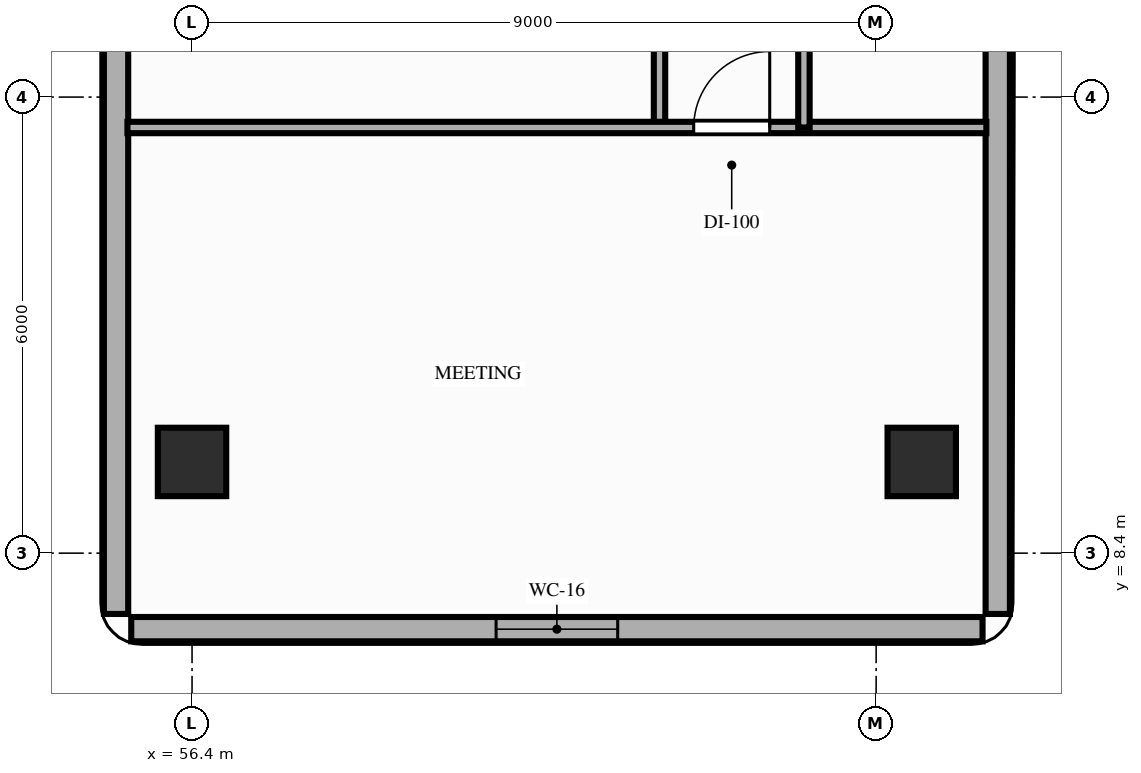
"""IFC4 building model, lengths in metres.
Left out: names, types, materials, properties, quantities, classifications, styles, units other than length and angle.
Written with IfcOpenShell. Run it as: python <this file> out.ifc"""

import sys

from ifc_helpers import new_model, si_unit, direction, frame, frame_2d, origin, origin_2d, place, context, subcontext, project, spatial, rectangle, extrude, element, fill, save


model = new_model("IFC4")
c1 = context("Model", 3, precision=1e-05, world=origin(), true_north=direction((0.0, 1.0)))
c2 = subcontext(c1, "Body", "Model", "MODEL_VIEW")
j1 = project(units=[si_unit("LENGTHUNIT", "METRE"), si_unit("PLANEANGLEUNIT", "RADIAN")], contexts=[c1])
p1 = place(None, origin())
s1 = spatial("IfcSite", under=j1, at=p1, CompositionType="ELEMENT")
p2 = place(p1, origin())
s2 = spatial("IfcBuilding", under=s1, at=p2, CompositionType="ELEMENT")
p3 = place(p2, frame((0.0, 0.0, 66.0)))
s3 = spatial("IfcBuildingStorey", under=s2, at=p3, CompositionType="ELEMENT", Elevation=66.0)
for number, where, z_axis, x_axis in (
    (1, (56.4, 9.6, 0.0), (0.0, 0.0, 1.0), (1.0, 0.0, 0.0)),
    (2, (66.0, 9.6, 0.0), (0.0, 0.0, 1.0), (1.0, 0.0, 0.0)),
):
    element("IfcColumn", number, at=place(p3, frame(where, z_axis=z_axis, x_axis=x_axis)), inside=s3, PredefinedType="COLUMN", context=c2, shape_type="SweptSolid", body=[
        extrude(rectangle(XDim=0.9, YDim=0.9, at=origin_2d()), origin(), (0.0, 0.0, 1.0), 3.2),
    ])
p4 = place(p3, frame((55.6, 7.4, 0.0), z_axis=(0.0, 0.0, 1.0), x_axis=(1.0, 0.0, 0.0)))
e3 = element("IfcWall", 3, at=p4, inside=s3, PredefinedType="STANDARD", context=c2, shape_type="SweptSolid", body=[
    extrude(rectangle(XDim=11.2, YDim=0.32, at=frame_2d((5.6, 0.0))), origin(), (0.0, 0.0, 1.0), 3.02),
])
p5 = place(p4, frame((4.8, 0.0, 0.85)))
e4 = element("IfcOpeningElement", 4, at=p5, cuts=e3, PredefinedType="OPENING", context=c2, shape_type="SweptSolid", body=[
    extrude(rectangle(XDim=1.6, YDim=1.7, at=frame_2d((0.8, 0.85))), frame((0.0, 0.17, 0.0), z_axis=(0.0, -1.0, 0.0), x_axis=(1.0, 0.0, 0.0)), (0.0, 0.0, 1.0), 0.34),
])
for number, where, z_axis, x_axis in (
    (5, (55.4, 20.4, 0.0), (0.0, 0.0, 1.0), (0.0, -1.0, 0.0)),
    (6, (67.0, 7.6, 0.0), (0.0, 0.0, 1.0), (0.0, 1.0, 0.0)),
):
    element("IfcWall", number, at=place(p3, frame(where, z_axis=z_axis, x_axis=x_axis)), inside=s3, PredefinedType="STANDARD", context=c2, shape_type="SweptSolid", body=[
        extrude(rectangle(XDim=12.8, YDim=0.32, at=frame_2d((6.4, 0.0))), origin(), (0.0, 0.0, 1.0), 3.02),
    ])
p6 = place(p3, frame((62.55, 14.0, 0.0), z_axis=(0.0, 0.0, 1.0), x_axis=(0.0, 1.0, 0.0)))
e7 = element("IfcWall", 7, at=p6, inside=s3, PredefinedType="PARTITIONING", context=c2, shape_type="SweptSolid", body=[
    extrude(rectangle(XDim=6.75, YDim=0.15, at=frame_2d((3.375, 0.0))), origin(), (0.0, 0.0, 1.0), 2.6),
])
p7 = place(p6, frame((2.6, 0.0, 0.0)))
e8 = element("IfcOpeningElement", 8, at=p7, cuts=e7, PredefinedType="OPENING", context=c2, shape_type="SweptSolid", body=[
    extrude(rectangle(XDim=0.95, YDim=2.15, at=frame_2d((0.475, 1.075))), frame((0.0, 0.085, 0.0), z_axis=(0.0, -1.0, 0.0), x_axis=(1.0, 0.0, 0.0)), (0.0, 0.0, 1.0), 0.17),
])
p8 = place(p3, frame((55.55, 14.0, 0.0), z_axis=(0.0, 0.0, 1.0), x_axis=(1.0, 0.0, 0.0)))
e9 = element("IfcWall", 9, at=p8, inside=s3, PredefinedType="PARTITIONING", context=c2, shape_type="SweptSolid", body=[
    extrude(rectangle(XDim=11.3, YDim=0.15, at=frame_2d((5.65, 0.0))), origin(), (0.0, 0.0, 1.0), 2.6),
])
p9 = place(p8, frame((7.45, 0.0, 0.0)))
e10 = element("IfcOpeningElement", 10, at=p9, cuts=e9, PredefinedType="OPENING", context=c2, shape_type="SweptSolid", body=[
    extrude(rectangle(XDim=1.0, YDim=2.15, at=frame_2d((0.5, 1.075))), frame((0.0, 0.085, 0.0), z_axis=(0.0, -1.0, 0.0), x_axis=(1.0, 0.0, 0.0)), (0.0, 0.0, 1.0), 0.17),
])
p10 = place(p3, frame((64.45, 14.0, 0.0), z_axis=(0.0, 0.0, 1.0), x_axis=(0.0, 1.0, 0.0)))
e11 = element("IfcWall", 11, at=p10, inside=s3, PredefinedType="PARTITIONING", context=c2, shape_type="SweptSolid", body=[
    extrude(rectangle(XDim=6.75, YDim=0.15, at=frame_2d((3.375, 0.0))), origin(), (0.0, 0.0, 1.0), 2.6),
])
p11 = place(p10, frame((3.24, 0.0, 0.0)))
e12 = element("IfcOpeningElement", 12, at=p11, cuts=e11, PredefinedType="OPENING", context=c2, shape_type="SweptSolid", body=[
    extrude(rectangle(XDim=0.95, YDim=2.15, at=frame_2d((0.475, 1.075))), frame((0.0, 0.085, 0.0), z_axis=(0.0, -1.0, 0.0), x_axis=(1.0, 0.0, 0.0)), (0.0, 0.0, 1.0), 0.17),
])
p12 = place(p5, origin())
e13 = element("IfcWindow", 13, at=p12, inside=s3, PartitioningType="SINGLE_PANEL", PredefinedType="WINDOW", context=c2, shape_type="SweptSolid", body=[
    extrude(rectangle(XDim=1.6, YDim=1.7, at=frame_2d((0.8, 0.85))), frame((0.0, 0.03, 0.0), z_axis=(0.0, -1.0, 0.0), x_axis=(1.0, 0.0, 0.0)), (0.0, 0.0, 1.0), 0.06),
])
fill(e4, e13)
p13 = place(p9, origin())
e14 = element("IfcDoor", 14, at=p13, inside=s3, OperationType="SINGLE_SWING_RIGHT", PredefinedType="DOOR", context=c2, shape_type="SweptSolid", body=[
    extrude(rectangle(XDim=1.0, YDim=2.15, at=frame_2d((0.5, 1.075))), frame((0.0, 0.025, 0.0), z_axis=(0.0, -1.0, 0.0), x_axis=(1.0, 0.0, 0.0)), (0.0, 0.0, 1.0), 0.05),
])
fill(e10, e14)
save(model, sys.argv[1])
